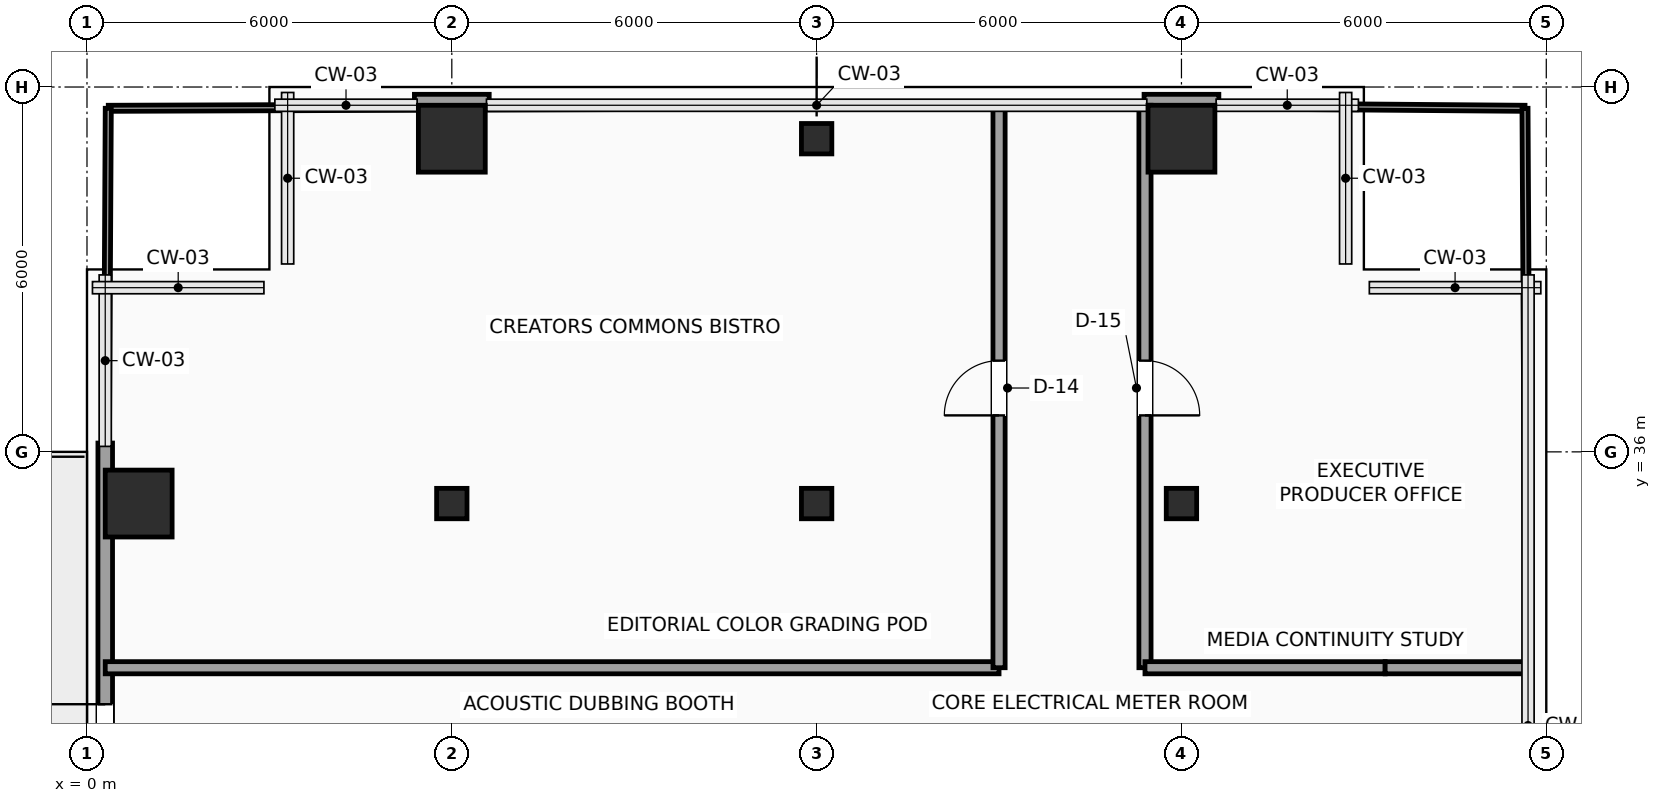
"""IFC4 building model, lengths in metres.
Left out: names, types, materials, properties, quantities, classifications, styles, units other than length and angle.
Written with IfcOpenShell. Run it as: python <this file> out.ifc"""

import sys

from ifc_helpers import new_model, si_unit, direction, frame, frame_2d, origin, origin_2d, place, context, subcontext, project, spatial, rectangle, hollow_rectangle, extrude, element, fill, save


model = new_model("IFC4")
c1 = context("Model", 3, precision=1e-05, world=origin(), true_north=direction((0.0, 1.0)))
c2 = subcontext(c1, "Body", "Model", "MODEL_VIEW")
j1 = project(units=[si_unit("LENGTHUNIT", "METRE"), si_unit("PLANEANGLEUNIT", "RADIAN")], contexts=[c1])
p1 = place(None, origin())
s1 = spatial("IfcSite", under=j1, at=p1, CompositionType="ELEMENT")
p2 = place(p1, origin())
s2 = spatial("IfcBuilding", under=s1, at=p2, CompositionType="ELEMENT")
p3 = place(p2, frame((0.0, 0.0, 138.15)))
s3 = spatial("IfcBuildingStorey", under=s2, at=p3, CompositionType="ELEMENT", Elevation=138.15)
p4 = place(p3, frame((0.85, 35.15, 0.0), z_axis=(0.0, 0.0, 1.0), x_axis=(1.0, 0.0, 0.0)))
e1 = element("IfcColumn", 1, at=p4, inside=s3, PredefinedType="COLUMN", context=c2, shape_type="SweptSolid", body=[
    extrude(rectangle(XDim=1.1, YDim=1.1, at=origin_2d()), origin(), (0.0, 0.0, 1.0), 3.75),
])
p5 = place(p3, frame((6.0, 35.15, 0.0), z_axis=(0.0, 0.0, 1.0), x_axis=(1.0, 0.0, 0.0)))
e2 = element("IfcColumn", 2, at=p5, inside=s3, PredefinedType="COLUMN", context=c2, shape_type="SweptSolid", body=[
    extrude(hollow_rectangle(XDim=0.5, YDim=0.5, WallThickness=0.025, InnerFilletRadius=0.025, OuterFilletRadius=0.04, at=origin_2d()), origin(), (0.0, 0.0, 1.0), 3.75),
])
p6 = place(p3, frame((6.0, 41.15, 0.0), z_axis=(0.0, 0.0, 1.0), x_axis=(1.0, 0.0, 0.0)))
e3 = element("IfcColumn", 3, at=p6, inside=s3, PredefinedType="COLUMN", context=c2, shape_type="SweptSolid", body=[
    extrude(rectangle(XDim=1.1, YDim=1.1, at=origin_2d()), origin(), (0.0, 0.0, 1.0), 3.75),
])
for number, where, z_axis, x_axis in (
    (4, (12.0, 35.15, 0.0), (0.0, 0.0, 1.0), (1.0, 0.0, 0.0)),
    (5, (12.0, 41.15, 0.0), (0.0, 0.0, 1.0), (1.0, 0.0, 0.0)),
    (6, (18.0, 35.15, 0.0), (0.0, 0.0, 1.0), (1.0, 0.0, 0.0)),
):
    element("IfcColumn", number, at=place(p3, frame(where, z_axis=z_axis, x_axis=x_axis)), inside=s3, PredefinedType="COLUMN", context=c2, shape_type="SweptSolid", body=[
        extrude(hollow_rectangle(XDim=0.5, YDim=0.5, WallThickness=0.025, InnerFilletRadius=0.025, OuterFilletRadius=0.04, at=origin_2d()), origin(), (0.0, 0.0, 1.0), 3.75),
    ])
p7 = place(p3, frame((18.0, 41.15, 0.0), z_axis=(0.0, 0.0, 1.0), x_axis=(1.0, 0.0, 0.0)))
e7 = element("IfcColumn", 7, at=p7, inside=s3, PredefinedType="COLUMN", context=c2, shape_type="SweptSolid", body=[
    extrude(rectangle(XDim=1.1, YDim=1.1, at=origin_2d()), origin(), (0.0, 0.0, 1.0), 3.75),
])
p8 = place(p3, frame((0.3, 26.855, 0.0), z_axis=(0.0, 0.0, 1.0), x_axis=(0.0, 1.0, 0.0)))
e8 = element("IfcWall", 8, at=p8, inside=s3, PredefinedType="SOLIDWALL", context=c2, shape_type="SweptSolid", body=[
    extrude(rectangle(XDim=9.29, YDim=0.24, at=frame_2d((4.645, 0.0))), origin(), (0.0, 0.0, 1.0), 3.525),
])
p9 = place(p8, frame((3.945, 0.0, 0.0)))
e9 = element("IfcOpeningElement", 9, at=p9, cuts=e8, PredefinedType="OPENING", context=c2, shape_type="SweptSolid", body=[
    extrude(rectangle(XDim=1.05, YDim=2.2, at=frame_2d((0.525, 1.1))), frame((0.0, 0.13, 0.0), z_axis=(0.0, -1.0, 0.0), x_axis=(1.0, 0.0, 0.0)), (0.0, 0.0, 1.0), 0.26),
])
for number, where, z_axis, x_axis in (
    (10, (5.385, 41.76, 0.0), (0.0, 0.0, 1.0), (1.0, 0.0, 0.0)),
    (11, (17.385, 41.76, 0.0), (0.0, 0.0, 1.0), (1.0, 0.0, 0.0)),
):
    element("IfcWall", number, at=place(p3, frame(where, z_axis=z_axis, x_axis=x_axis)), inside=s3, PredefinedType="SOLIDWALL", context=c2, shape_type="SweptSolid", body=[
        extrude(rectangle(XDim=1.23, YDim=0.24, at=frame_2d((0.615, 0.0))), origin(), (0.0, 0.0, 1.0), 3.525),
    ])
p10 = place(p3, frame((0.3, 32.45, 0.0), z_axis=(0.0, 0.0, 1.0), x_axis=(1.0, 0.0, 0.0)))
e12 = element("IfcWall", 12, at=p10, inside=s3, PredefinedType="PARTITIONING", context=c2, shape_type="SweptSolid", body=[
    extrude(rectangle(XDim=14.7, YDim=0.2, at=frame_2d((7.35, 0.0))), origin(), (0.0, 0.0, 1.0), 3.525),
])
p11 = place(p3, frame((15.0, 32.45, 0.0), z_axis=(0.0, 0.0, 1.0), x_axis=(0.0, 1.0, 0.0)))
e13 = element("IfcWall", 13, at=p11, inside=s3, PredefinedType="PARTITIONING", context=c2, shape_type="SweptSolid", body=[
    extrude(rectangle(XDim=9.25, YDim=0.2, at=frame_2d((4.625, 0.0))), origin(), (0.0, 0.0, 1.0), 3.525),
])
p12 = place(p11, frame((4.15, 0.0, 0.0)))
e14 = element("IfcOpeningElement", 14, at=p12, cuts=e13, PredefinedType="OPENING", context=c2, shape_type="SweptSolid", body=[
    extrude(rectangle(XDim=0.9, YDim=2.1, at=frame_2d((0.45, 1.05))), frame((0.0, 0.11, 0.0), z_axis=(0.0, -1.0, 0.0), x_axis=(1.0, 0.0, 0.0)), (0.0, 0.0, 1.0), 0.22),
])
p13 = place(p3, frame((17.4, 41.7, 0.0), z_axis=(0.0, 0.0, 1.0), x_axis=(0.0, -1.0, 0.0)))
e15 = element("IfcWall", 15, at=p13, inside=s3, PredefinedType="PARTITIONING", context=c2, shape_type="SweptSolid", body=[
    extrude(rectangle(XDim=9.25, YDim=0.2, at=frame_2d((4.625, 0.0))), origin(), (0.0, 0.0, 1.0), 3.525),
])
p14 = place(p13, frame((4.2, 0.0, 0.0)))
e16 = element("IfcOpeningElement", 16, at=p14, cuts=e15, PredefinedType="OPENING", context=c2, shape_type="SweptSolid", body=[
    extrude(rectangle(XDim=0.9, YDim=2.1, at=frame_2d((0.45, 1.05))), frame((0.0, 0.11, 0.0), z_axis=(0.0, -1.0, 0.0), x_axis=(1.0, 0.0, 0.0)), (0.0, 0.0, 1.0), 0.22),
])
p15 = place(p3, frame((17.4, 32.45, 0.0), z_axis=(0.0, 0.0, 1.0), x_axis=(1.0, 0.0, 0.0)))
e17 = element("IfcWall", 17, at=p15, inside=s3, PredefinedType="PARTITIONING", context=c2, shape_type="SweptSolid", body=[
    extrude(rectangle(XDim=3.95, YDim=0.2, at=frame_2d((1.975, 0.0))), origin(), (0.0, 0.0, 1.0), 3.525),
])
p16 = place(p3, frame((21.35, 32.45, 0.0), z_axis=(0.0, 0.0, 1.0), x_axis=(1.0, 0.0, 0.0)))
e18 = element("IfcWall", 18, at=p16, inside=s3, PredefinedType="PARTITIONING", context=c2, shape_type="SweptSolid", body=[
    extrude(rectangle(XDim=2.35, YDim=0.2, at=frame_2d((1.175, 0.0))), origin(), (0.0, 0.0, 1.0), 3.525),
])
p17 = place(p3, frame((0.35, 41.65, 0.0), z_axis=(0.0, 0.0, 1.0), x_axis=(0.999994073761, 0.003442737683, 0.0)))
e19 = element("IfcWall", 19, at=p17, inside=s3, PredefinedType="PARTITIONING", context=c2, shape_type="SweptSolid", body=[
    extrude(rectangle(XDim=5.035, YDim=0.1, at=frame_2d((2.518, 0.0))), origin(), (0.0, 0.0, 1.0), 3.525),
])
p18 = place(p3, frame((6.615, 41.671, 0.0), z_axis=(0.0, 0.0, 1.0), x_axis=(0.999994197557, 0.003406589638, 0.0)))
e20 = element("IfcWall", 20, at=p18, inside=s3, PredefinedType="PARTITIONING", context=c2, shape_type="SweptSolid", body=[
    extrude(rectangle(XDim=8.385, YDim=0.1, at=frame_2d((4.192, 0.0))), origin(), (0.0, 0.0, 1.0), 3.525),
])
p19 = place(p3, frame((0.32, 36.145, 0.0), z_axis=(0.0, 0.0, 1.0), x_axis=(0.005454948109, 0.99998512166, 0.0)))
e21 = element("IfcWall", 21, at=p19, inside=s3, PredefinedType="PARTITIONING", context=c2, shape_type="SweptSolid", body=[
    extrude(rectangle(XDim=5.505, YDim=0.1, at=frame_2d((2.752, 0.0))), origin(), (0.0, 0.0, 1.0), 3.525),
])
p20 = place(p3, frame((18.615, 41.69, 0.0), z_axis=(0.0, 0.0, 1.0), x_axis=(0.99996799533, -0.008000519771, 0.0)))
e22 = element("IfcWall", 22, at=p20, inside=s3, PredefinedType="PARTITIONING", context=c2, shape_type="SweptSolid", body=[
    extrude(rectangle(XDim=5.035, YDim=0.1, at=frame_2d((2.518, 0.0))), origin(), (0.0, 0.0, 1.0), 3.525),
])
p21 = place(p3, frame((23.7, 32.45, 0.0), z_axis=(0.0, 0.0, 1.0), x_axis=(-0.005440038388, 0.999985202882, 0.0)))
e23 = element("IfcWall", 23, at=p21, inside=s3, PredefinedType="PARTITIONING", context=c2, shape_type="SweptSolid", body=[
    extrude(rectangle(XDim=9.2, YDim=0.1, at=frame_2d((4.6, 0.0))), origin(), (0.0, 0.0, 1.0), 3.525),
])
p22 = place(p9, origin())
e24 = element("IfcDoor", 24, at=p22, inside=s3, OperationType="SINGLE_SWING_RIGHT", PredefinedType="DOOR", context=c2, shape_type="SweptSolid", body=[
    extrude(rectangle(XDim=1.05, YDim=2.2, at=frame_2d((0.525, 1.1))), frame((0.0, 0.025, 0.0), z_axis=(0.0, -1.0, 0.0), x_axis=(1.0, 0.0, 0.0)), (0.0, 0.0, 1.0), 0.05),
])
fill(e9, e24)
p23 = place(p12, origin())
e25 = element("IfcDoor", 25, at=p23, inside=s3, OperationType="SINGLE_SWING_LEFT", PredefinedType="DOOR", context=c2, shape_type="SweptSolid", body=[
    extrude(rectangle(XDim=0.9, YDim=2.1, at=frame_2d((0.45, 1.05))), frame((0.0, 0.025, 0.0), z_axis=(0.0, -1.0, 0.0), x_axis=(1.0, 0.0, 0.0)), (0.0, 0.0, 1.0), 0.05),
])
fill(e14, e25)
p24 = place(p14, origin())
e26 = element("IfcDoor", 26, at=p24, inside=s3, OperationType="SINGLE_SWING_RIGHT", PredefinedType="DOOR", context=c2, shape_type="SweptSolid", body=[
    extrude(rectangle(XDim=0.9, YDim=2.1, at=frame_2d((0.45, 1.05))), frame((0.0, 0.025, 0.0), z_axis=(0.0, -1.0, 0.0), x_axis=(1.0, 0.0, 0.0)), (0.0, 0.0, 1.0), 0.05),
])
fill(e16, e26)
save(model, sys.argv[1])
